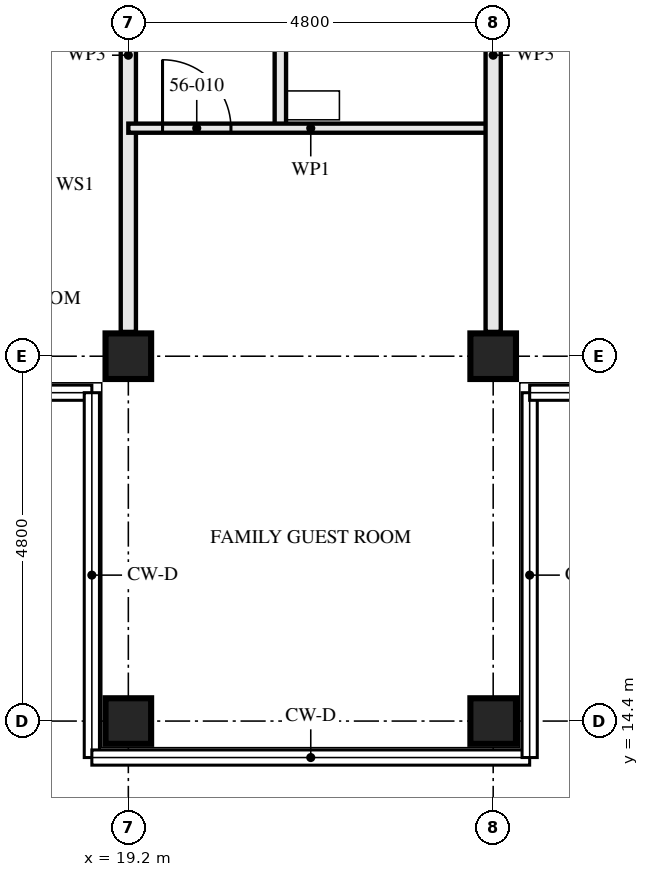
"""IFC4 building model, lengths in metres.
Left out: names, types, materials, properties, quantities, classifications, styles, units other than length and angle.
Written with IfcOpenShell. Run it as: python <this file> out.ifc"""

import sys

from ifc_helpers import new_model, si_unit, direction, frame, frame_2d, origin, origin_2d, place, context, subcontext, project, spatial, rectangle, hollow_rectangle, extrude, element, fill, save


model = new_model("IFC4")
c1 = context("Model", 3, precision=1e-05, world=origin(), true_north=direction((0.0, 1.0)))
c2 = subcontext(c1, "Body", "Model", "MODEL_VIEW")
j1 = project(units=[si_unit("LENGTHUNIT", "METRE"), si_unit("PLANEANGLEUNIT", "RADIAN")], contexts=[c1])
p1 = place(None, origin())
s1 = spatial("IfcSite", under=j1, at=p1, CompositionType="ELEMENT")
p2 = place(p1, origin())
s2 = spatial("IfcBuilding", under=s1, at=p2, CompositionType="ELEMENT")
p3 = place(p2, frame((0.0, 0.0, 205.0)))
s3 = spatial("IfcBuildingStorey", under=s2, at=p3, CompositionType="ELEMENT", Elevation=205.0)
for number, where, z_axis, x_axis in (
    (1, (19.2, 14.4, 0.0), (0.0, 0.0, 1.0), (0.0, 1.0, 0.0)),
    (2, (19.2, 19.2, 0.0), (0.0, 0.0, 1.0), (0.0, 1.0, 0.0)),
    (3, (24.0, 14.4, 0.0), (0.0, 0.0, 1.0), (0.0, 1.0, 0.0)),
    (4, (24.0, 19.2, 0.0), (0.0, 0.0, 1.0), (0.0, 1.0, 0.0)),
):
    element("IfcColumn", number, at=place(p3, frame(where, z_axis=z_axis, x_axis=x_axis)), inside=s3, PredefinedType="COLUMN", context=c2, shape_type="SweptSolid", body=[
        extrude(hollow_rectangle(XDim=0.6, YDim=0.6, WallThickness=0.05, at=origin_2d()), origin(), (0.0, 0.0, 1.0), 3.5),
    ])
p4 = place(p3, frame((19.2, 19.52, 0.0), z_axis=(0.0, 0.0, 1.0), x_axis=(0.0, 1.0, 0.0)))
e5 = element("IfcWall", 5, at=p4, inside=s3, PredefinedType="PARTITIONING", context=c2, shape_type="SweptSolid", body=[
    extrude(rectangle(XDim=7.28, YDim=0.2, at=frame_2d((3.64, 0.0))), origin(), (0.0, 0.0, 1.0), 2.55),
])
p5 = place(p3, frame((21.2, 22.2, 0.0), z_axis=(0.0, 0.0, 1.0), x_axis=(0.0, 1.0, 0.0)))
e6 = element("IfcWall", 6, at=p5, inside=s3, PredefinedType="PARTITIONING", context=c2, shape_type="SweptSolid", body=[
    extrude(rectangle(XDim=3.0, YDim=0.15, at=frame_2d((1.5, 0.0))), origin(), (0.0, 0.0, 1.0), 2.55),
])
p6 = place(p5, frame((1.05, 0.0, 0.0)))
e7 = element("IfcOpeningElement", 7, at=p6, cuts=e6, PredefinedType="OPENING", context=c2, shape_type="SweptSolid", body=[
    extrude(rectangle(XDim=0.9, YDim=2.1, at=frame_2d((0.45, 1.05))), frame((0.0, 0.085, 0.0), z_axis=(0.0, -1.0, 0.0), x_axis=(1.0, 0.0, 0.0)), (0.0, 0.0, 1.0), 0.171),
])
p7 = place(p3, frame((19.2, 22.2, 0.0), z_axis=(0.0, 0.0, 1.0), x_axis=(1.0, 0.0, 0.0)))
e8 = element("IfcWall", 8, at=p7, inside=s3, PredefinedType="PARTITIONING", context=c2, shape_type="SweptSolid", body=[
    extrude(rectangle(XDim=4.8, YDim=0.12, at=frame_2d((2.4, 0.0))), origin(), (0.0, 0.0, 1.0), 3.33),
])
p8 = place(p7, frame((0.45, 0.0, 0.0)))
e9 = element("IfcOpeningElement", 9, at=p8, cuts=e8, PredefinedType="OPENING", context=c2, shape_type="SweptSolid", body=[
    extrude(rectangle(XDim=0.9, YDim=2.1, at=frame_2d((0.45, 1.05))), frame((0.0, 0.071, 0.0), z_axis=(0.0, -1.0, 0.0), x_axis=(1.0, 0.0, 0.0)), (0.0, 0.0, 1.0), 0.141),
])
p9 = place(p3, frame((24.0, 19.52, 0.0), z_axis=(0.0, 0.0, 1.0), x_axis=(0.0, 1.0, 0.0)))
e10 = element("IfcWall", 10, at=p9, inside=s3, PredefinedType="PARTITIONING", context=c2, shape_type="SweptSolid", body=[
    extrude(rectangle(XDim=7.28, YDim=0.2, at=frame_2d((3.64, 0.0))), origin(), (0.0, 0.0, 1.0), 2.55),
])
p10 = place(p8, origin())
e11 = element("IfcDoor", 11, at=p10, inside=s3, OperationType="SINGLE_SWING_RIGHT", PredefinedType="DOOR", context=c2, shape_type="SweptSolid", body=[
    extrude(rectangle(XDim=0.9, YDim=2.1, at=frame_2d((0.45, 1.05))), frame((0.0, 0.022, 0.0), z_axis=(0.0, -1.0, 0.0), x_axis=(1.0, 0.0, 0.0)), (0.0, 0.0, 1.0), 0.044),
])
fill(e9, e11)
save(model, sys.argv[1])
